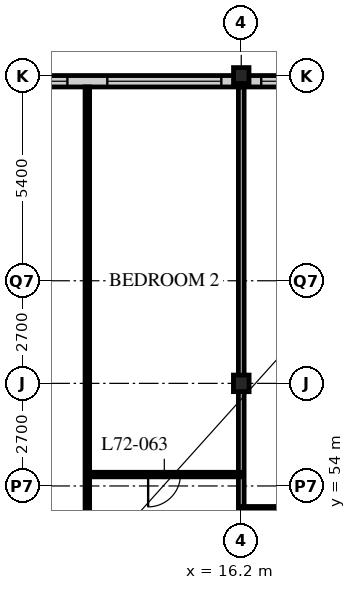
"""IFC4 building model, lengths in metres.
Left out: names, types, materials, properties, quantities, classifications, styles, units other than length and angle.
Written with IfcOpenShell. Run it as: python <this file> out.ifc"""

import sys

from ifc_helpers import new_model, si_unit, direction, frame, frame_2d, origin, origin_2d, place, context, subcontext, project, spatial, rectangle, i_section, extrude, element, fill, save


model = new_model("IFC4")
c1 = context("Model", 3, precision=1e-05, world=origin(), true_north=direction((0.0, 1.0)))
c2 = subcontext(c1, "Body", "Model", "MODEL_VIEW")
j1 = project(units=[si_unit("LENGTHUNIT", "METRE"), si_unit("PLANEANGLEUNIT", "RADIAN")], contexts=[c1])
p1 = place(None, origin())
s1 = spatial("IfcSite", under=j1, at=p1, CompositionType="ELEMENT")
p2 = place(p1, origin())
s2 = spatial("IfcBuilding", under=s1, at=p2, CompositionType="ELEMENT")
p3 = place(p2, frame((0.0, 0.0, 281.4)))
s3 = spatial("IfcBuildingStorey", under=s2, at=p3, CompositionType="ELEMENT", Elevation=281.4)
p4 = place(p3, frame((16.2, 56.7, 0.0), z_axis=(0.0, 0.0, 1.0), x_axis=(1.0, 0.0, 0.0)))
e1 = element("IfcColumn", 1, at=p4, inside=s3, PredefinedType="COLUMN", context=c2, shape_type="SweptSolid", body=[
    extrude(i_section(OverallWidth=0.412, OverallDepth=0.437, WebThickness=0.036, FlangeThickness=0.058, FilletRadius=0.015, at=origin_2d()), origin(), (0.0, 0.0, 1.0), 3.9),
])
p5 = place(p3, frame((16.2, 64.8, 0.0), z_axis=(0.0, 0.0, 1.0), x_axis=(1.0, 0.0, 0.0)))
e2 = element("IfcColumn", 2, at=p5, inside=s3, PredefinedType="COLUMN", context=c2, shape_type="SweptSolid", body=[
    extrude(i_section(OverallWidth=0.407, OverallDepth=0.419, WebThickness=0.031, FlangeThickness=0.049, FilletRadius=0.015, at=origin_2d()), origin(), (0.0, 0.0, 1.0), 3.9),
])
p6 = place(p3, frame((48.3, 64.65, 0.0), z_axis=(0.0, 0.0, 1.0), x_axis=(-1.0, 0.0, 0.0)))
e3 = element("IfcWall", 3, at=p6, inside=s3, PredefinedType="SOLIDWALL", context=c2, shape_type="SweptSolid", body=[
    extrude(rectangle(XDim=40.2, YDim=0.3, at=frame_2d((20.1, 0.0))), origin(), (0.0, 0.0, 1.0), 3.69),
])
p7 = place(p6, frame((0.225, 0.0, 0.6)))
e4 = element("IfcOpeningElement", 4, at=p7, cuts=e3, PredefinedType="OPENING", context=c2, shape_type="SweptSolid", body=[
    extrude(rectangle(XDim=3.0, YDim=2.4, at=frame_2d((1.5, 1.2))), frame((0.0, 0.16, 0.0), z_axis=(0.0, -1.0, 0.0), x_axis=(1.0, 0.0, 0.0)), (0.0, 0.0, 1.0), 0.32),
])
p8 = place(p6, frame((4.275, 0.0, 0.6)))
e5 = element("IfcOpeningElement", 5, at=p8, cuts=e3, PredefinedType="OPENING", context=c2, shape_type="SweptSolid", body=[
    extrude(rectangle(XDim=3.0, YDim=2.4, at=frame_2d((1.5, 1.2))), frame((0.0, 0.16, 0.0), z_axis=(0.0, -1.0, 0.0), x_axis=(1.0, 0.0, 0.0)), (0.0, 0.0, 1.0), 0.32),
])
p9 = place(p6, frame((8.325, 0.0, 0.6)))
e6 = element("IfcOpeningElement", 6, at=p9, cuts=e3, PredefinedType="OPENING", context=c2, shape_type="SweptSolid", body=[
    extrude(rectangle(XDim=3.0, YDim=2.4, at=frame_2d((1.5, 1.2))), frame((0.0, 0.16, 0.0), z_axis=(0.0, -1.0, 0.0), x_axis=(1.0, 0.0, 0.0)), (0.0, 0.0, 1.0), 0.32),
])
p10 = place(p6, frame((12.375, 0.0, 0.6)))
e7 = element("IfcOpeningElement", 7, at=p10, cuts=e3, PredefinedType="OPENING", context=c2, shape_type="SweptSolid", body=[
    extrude(rectangle(XDim=3.0, YDim=2.4, at=frame_2d((1.5, 1.2))), frame((0.0, 0.16, 0.0), z_axis=(0.0, -1.0, 0.0), x_axis=(1.0, 0.0, 0.0)), (0.0, 0.0, 1.0), 0.32),
])
p11 = place(p6, frame((16.425, 0.0, 0.6)))
e8 = element("IfcOpeningElement", 8, at=p11, cuts=e3, PredefinedType="OPENING", context=c2, shape_type="SweptSolid", body=[
    extrude(rectangle(XDim=3.0, YDim=2.4, at=frame_2d((1.5, 1.2))), frame((0.0, 0.16, 0.0), z_axis=(0.0, -1.0, 0.0), x_axis=(1.0, 0.0, 0.0)), (0.0, 0.0, 1.0), 0.32),
])
p12 = place(p6, frame((20.475, 0.0, 0.6)))
e9 = element("IfcOpeningElement", 9, at=p12, cuts=e3, PredefinedType="OPENING", context=c2, shape_type="SweptSolid", body=[
    extrude(rectangle(XDim=3.0, YDim=2.4, at=frame_2d((1.5, 1.2))), frame((0.0, 0.16, 0.0), z_axis=(0.0, -1.0, 0.0), x_axis=(1.0, 0.0, 0.0)), (0.0, 0.0, 1.0), 0.32),
])
p13 = place(p6, frame((24.525, 0.0, 0.6)))
e10 = element("IfcOpeningElement", 10, at=p13, cuts=e3, PredefinedType="OPENING", context=c2, shape_type="SweptSolid", body=[
    extrude(rectangle(XDim=3.0, YDim=2.4, at=frame_2d((1.5, 1.2))), frame((0.0, 0.16, 0.0), z_axis=(0.0, -1.0, 0.0), x_axis=(1.0, 0.0, 0.0)), (0.0, 0.0, 1.0), 0.32),
])
p14 = place(p6, frame((28.575, 0.0, 0.6)))
e11 = element("IfcOpeningElement", 11, at=p14, cuts=e3, PredefinedType="OPENING", context=c2, shape_type="SweptSolid", body=[
    extrude(rectangle(XDim=3.0, YDim=2.4, at=frame_2d((1.5, 1.2))), frame((0.0, 0.16, 0.0), z_axis=(0.0, -1.0, 0.0), x_axis=(1.0, 0.0, 0.0)), (0.0, 0.0, 1.0), 0.32),
])
p15 = place(p6, frame((32.625, 0.0, 0.6)))
e12 = element("IfcOpeningElement", 12, at=p15, cuts=e3, PredefinedType="OPENING", context=c2, shape_type="SweptSolid", body=[
    extrude(rectangle(XDim=3.0, YDim=2.4, at=frame_2d((1.5, 1.2))), frame((0.0, 0.16, 0.0), z_axis=(0.0, -1.0, 0.0), x_axis=(1.0, 0.0, 0.0)), (0.0, 0.0, 1.0), 0.32),
])
p16 = place(p6, frame((36.675, 0.0, 0.6)))
e13 = element("IfcOpeningElement", 13, at=p16, cuts=e3, PredefinedType="OPENING", context=c2, shape_type="SweptSolid", body=[
    extrude(rectangle(XDim=3.0, YDim=2.4, at=frame_2d((1.5, 1.2))), frame((0.0, 0.16, 0.0), z_axis=(0.0, -1.0, 0.0), x_axis=(1.0, 0.0, 0.0)), (0.0, 0.0, 1.0), 0.32),
])
p17 = place(p3, frame((12.15, 51.0, 0.0), z_axis=(0.0, 0.0, 1.0), x_axis=(0.0, 1.0, 0.0)))
e14 = element("IfcWall", 14, at=p17, inside=s3, PredefinedType="PARTITIONING", context=c2, shape_type="SweptSolid", body=[
    extrude(rectangle(XDim=13.5, YDim=0.12, at=frame_2d((6.75, 0.0))), origin(), (0.0, 0.0, 1.0), 3.69),
])
p18 = place(p3, frame((16.2, 48.6, 0.0), z_axis=(0.0, 0.0, 1.0), x_axis=(0.0, 1.0, 0.0)))
e15 = element("IfcWall", 15, at=p18, inside=s3, PredefinedType="PARTITIONING", context=c2, shape_type="SweptSolid", body=[
    extrude(rectangle(XDim=15.9, YDim=0.15, at=frame_2d((7.95, 0.0))), origin(), (0.0, 0.0, 1.0), 3.078),
])
p19 = place(p3, frame((16.2, 53.4, 0.0), z_axis=(0.0, 0.0, 1.0), x_axis=(1.0, 0.0, 0.0)))
e16 = element("IfcWall", 16, at=p19, inside=s3, PredefinedType="PARTITIONING", context=c2, shape_type="SweptSolid", body=[
    extrude(rectangle(XDim=8.1, YDim=0.12, at=frame_2d((4.05, 0.0))), origin(), (0.0, 0.0, 1.0), 3.69),
])
p20 = place(p19, frame((3.625, 0.0, 0.0)))
e17 = element("IfcOpeningElement", 17, at=p20, cuts=e16, PredefinedType="OPENING", context=c2, shape_type="SweptSolid", body=[
    extrude(rectangle(XDim=0.85, YDim=2.1, at=frame_2d((0.425, 1.05))), frame((0.0, 0.07, 0.0), z_axis=(0.0, -1.0, 0.0), x_axis=(1.0, 0.0, 0.0)), (0.0, 0.0, 1.0), 0.14),
])
p21 = place(p3, frame((12.15, 54.3, 0.0), z_axis=(0.0, 0.0, 1.0), x_axis=(1.0, 0.0, 0.0)))
e18 = element("IfcWall", 18, at=p21, inside=s3, PredefinedType="PARTITIONING", context=c2, shape_type="SweptSolid", body=[
    extrude(rectangle(XDim=4.05, YDim=0.12, at=frame_2d((2.025, 0.0))), origin(), (0.0, 0.0, 1.0), 3.69),
])
p22 = place(p21, frame((1.6, 0.0, 0.0)))
e19 = element("IfcOpeningElement", 19, at=p22, cuts=e18, PredefinedType="OPENING", context=c2, shape_type="SweptSolid", body=[
    extrude(rectangle(XDim=0.85, YDim=2.1, at=frame_2d((0.425, 1.05))), frame((0.0, 0.07, 0.0), z_axis=(0.0, -1.0, 0.0), x_axis=(1.0, 0.0, 0.0)), (0.0, 0.0, 1.0), 0.14),
])
p23 = place(p14, origin())
e20 = element("IfcWindow", 20, at=p23, inside=s3, PartitioningType="SINGLE_PANEL", PredefinedType="WINDOW", context=c2, shape_type="SweptSolid", body=[
    extrude(rectangle(XDim=3.0, YDim=2.4, at=frame_2d((1.5, 1.2))), frame((0.0, 0.03, 0.0), z_axis=(0.0, -1.0, 0.0), x_axis=(1.0, 0.0, 0.0)), (0.0, 0.0, 1.0), 0.06),
])
fill(e11, e20)
p24 = place(p15, origin())
e21 = element("IfcWindow", 21, at=p24, inside=s3, PartitioningType="SINGLE_PANEL", PredefinedType="WINDOW", context=c2, shape_type="SweptSolid", body=[
    extrude(rectangle(XDim=3.0, YDim=2.4, at=frame_2d((1.5, 1.2))), frame((0.0, 0.03, 0.0), z_axis=(0.0, -1.0, 0.0), x_axis=(1.0, 0.0, 0.0)), (0.0, 0.0, 1.0), 0.06),
])
fill(e12, e21)
p25 = place(p16, origin())
e22 = element("IfcWindow", 22, at=p25, inside=s3, PartitioningType="SINGLE_PANEL", PredefinedType="WINDOW", context=c2, shape_type="SweptSolid", body=[
    extrude(rectangle(XDim=3.0, YDim=2.4, at=frame_2d((1.5, 1.2))), frame((0.0, 0.03, 0.0), z_axis=(0.0, -1.0, 0.0), x_axis=(1.0, 0.0, 0.0)), (0.0, 0.0, 1.0), 0.06),
])
fill(e13, e22)
p26 = place(p22, origin())
e23 = element("IfcDoor", 23, at=p26, inside=s3, OperationType="SINGLE_SWING_RIGHT", PredefinedType="DOOR", context=c2, shape_type="SweptSolid", body=[
    extrude(rectangle(XDim=0.85, YDim=2.1, at=frame_2d((0.425, 1.05))), frame((0.0, 0.025, 0.0), z_axis=(0.0, -1.0, 0.0), x_axis=(1.0, 0.0, 0.0)), (0.0, 0.0, 1.0), 0.05),
])
fill(e19, e23)
save(model, sys.argv[1])
